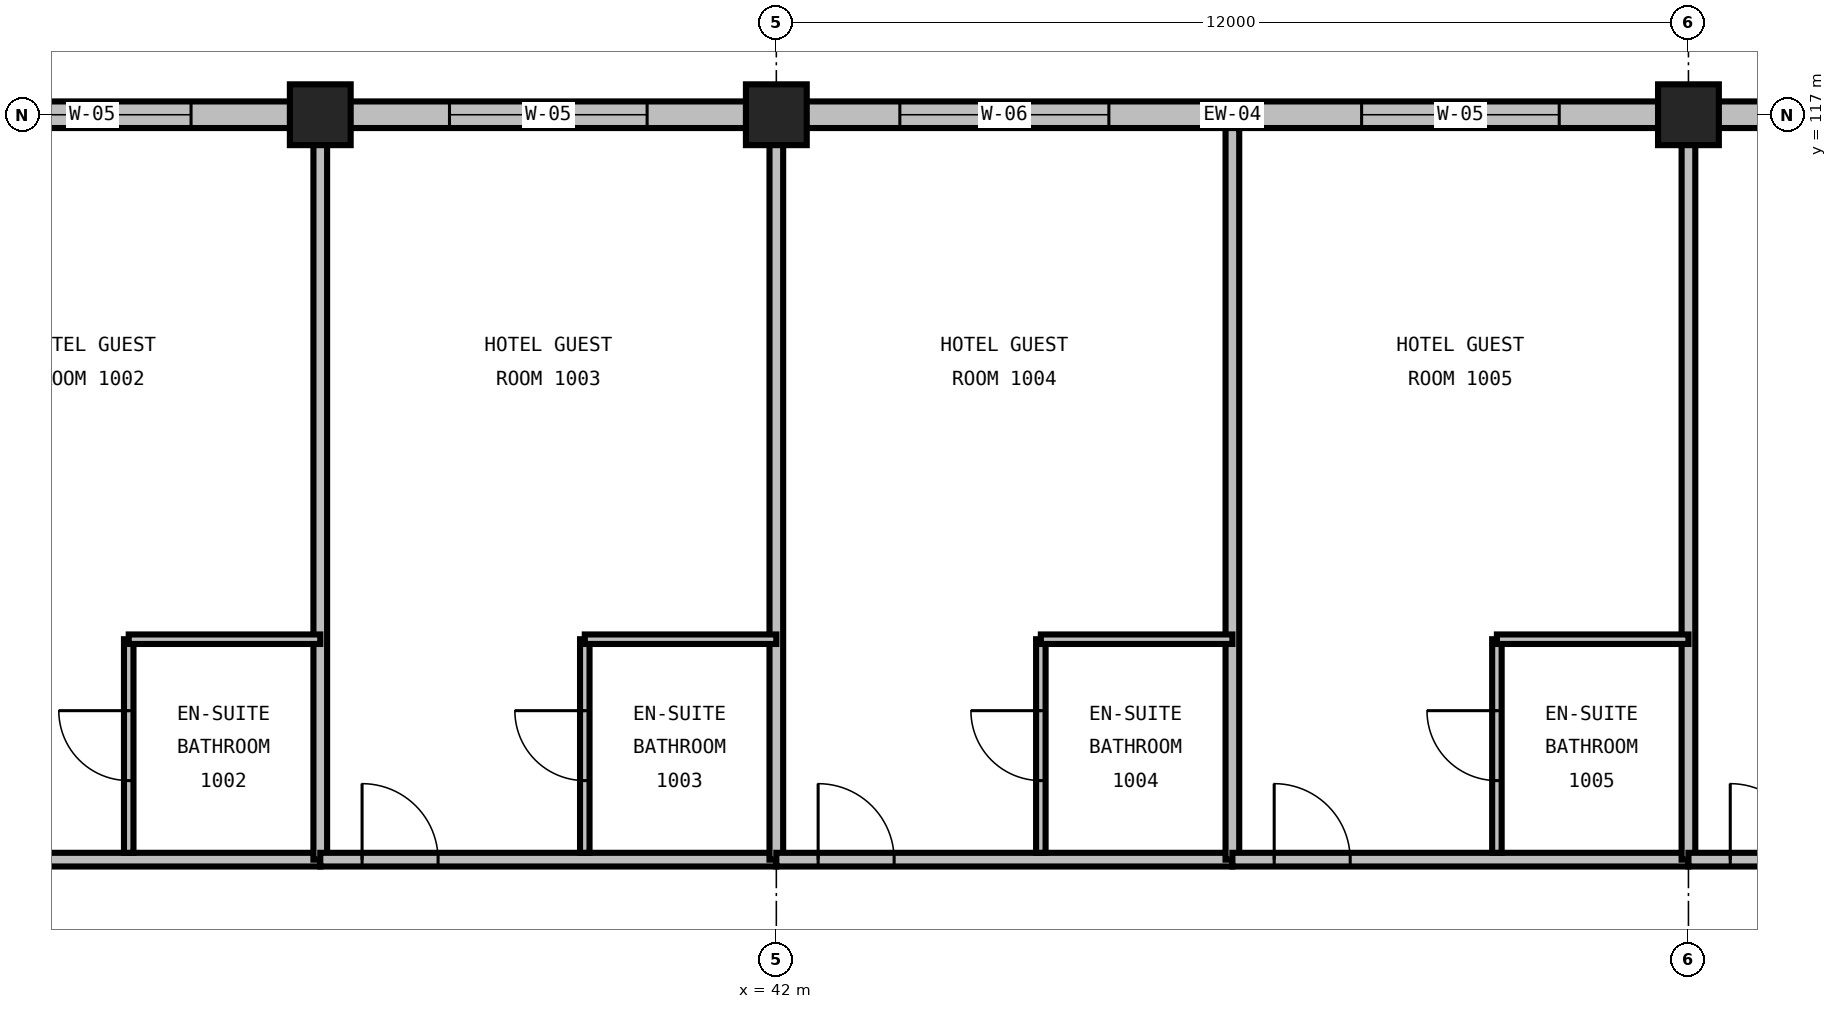
"""IFC4 building model, lengths in metres.
Left out: names, types, materials, properties, quantities, classifications, styles, units other than length and angle.
Written with IfcOpenShell. Run it as: python <this file> out.ifc"""

import sys

from ifc_helpers import new_model, si_unit, direction, frame, frame_2d, origin, origin_2d, place, context, subcontext, project, spatial, rectangle, extrude, element, fill, save


model = new_model("IFC4")
c1 = context("Model", 3, precision=1e-05, world=origin(), true_north=direction((0.0, 1.0)))
c2 = subcontext(c1, "Body", "Model", "MODEL_VIEW")
j1 = project(units=[si_unit("LENGTHUNIT", "METRE"), si_unit("PLANEANGLEUNIT", "RADIAN")], contexts=[c1])
p1 = place(None, origin())
s1 = spatial("IfcSite", under=j1, at=p1, CompositionType="ELEMENT")
p2 = place(p1, origin())
s2 = spatial("IfcBuilding", under=s1, at=p2, CompositionType="ELEMENT")
p3 = place(p2, frame((0.0, 0.0, 45.6)))
s3 = spatial("IfcBuildingStorey", under=s2, at=p3, CompositionType="ELEMENT", Elevation=45.6)
for number, where, z_axis, x_axis in (
    (1, (36.0, 117.0, 0.0), (0.0, 0.0, 1.0), (1.0, 0.0, 0.0)),
    (2, (42.0, 117.0, 0.0), (0.0, 0.0, 1.0), (1.0, 0.0, 0.0)),
    (3, (54.0, 117.0, 0.0), (0.0, 0.0, 1.0), (1.0, 0.0, 0.0)),
):
    element("IfcColumn", number, at=place(p3, frame(where, z_axis=z_axis, x_axis=x_axis)), inside=s3, PredefinedType="COLUMN", context=c2, shape_type="SweptSolid", body=[
        extrude(rectangle(XDim=0.8, YDim=0.8, at=origin_2d()), origin(), (0.0, 0.0, 1.0), 3.6),
    ])
p4 = place(p3, frame((36.0, 117.0, 0.0), z_axis=(0.0, 0.0, 1.0), x_axis=(-1.0, 0.0, 0.0)))
e4 = element("IfcWall", 4, at=p4, inside=s3, PredefinedType="STANDARD", context=c2, shape_type="SweptSolid", body=[
    extrude(rectangle(XDim=6.0, YDim=0.35, at=frame_2d((3.0, 0.0))), origin(), (0.0, 0.0, 1.0), 2.486),
])
p5 = place(p4, frame((1.7, 0.0, 0.72)))
e5 = element("IfcOpeningElement", 5, at=p5, cuts=e4, PredefinedType="OPENING", context=c2, shape_type="SweptSolid", body=[
    extrude(rectangle(XDim=2.6, YDim=1.69, at=frame_2d((1.3, 0.845))), frame((0.0, 0.19, 0.0), z_axis=(0.0, -1.0, 0.0), x_axis=(1.0, 0.0, 0.0)), (0.0, 0.0, 1.0), 0.38),
])
p6 = place(p3, frame((42.0, 117.0, 0.0), z_axis=(0.0, 0.0, 1.0), x_axis=(-1.0, 0.0, 0.0)))
e6 = element("IfcWall", 6, at=p6, inside=s3, PredefinedType="STANDARD", context=c2, shape_type="SweptSolid", body=[
    extrude(rectangle(XDim=6.0, YDim=0.35, at=frame_2d((3.0, 0.0))), origin(), (0.0, 0.0, 1.0), 2.486),
])
p7 = place(p6, frame((1.7, 0.0, 0.72)))
e7 = element("IfcOpeningElement", 7, at=p7, cuts=e6, PredefinedType="OPENING", context=c2, shape_type="SweptSolid", body=[
    extrude(rectangle(XDim=2.6, YDim=1.69, at=frame_2d((1.3, 0.845))), frame((0.0, 0.19, 0.0), z_axis=(0.0, -1.0, 0.0), x_axis=(1.0, 0.0, 0.0)), (0.0, 0.0, 1.0), 0.38),
])
p8 = place(p3, frame((54.0, 117.0, 0.0), z_axis=(0.0, 0.0, 1.0), x_axis=(-1.0, 0.0, 0.0)))
e8 = element("IfcWall", 8, at=p8, inside=s3, PredefinedType="STANDARD", context=c2, shape_type="SweptSolid", body=[
    extrude(rectangle(XDim=12.0, YDim=0.35, at=frame_2d((6.0, 0.0))), origin(), (0.0, 0.0, 1.0), 2.486),
])
p9 = place(p8, frame((1.7, 0.0, 0.72)))
e9 = element("IfcOpeningElement", 9, at=p9, cuts=e8, PredefinedType="OPENING", context=c2, shape_type="SweptSolid", body=[
    extrude(rectangle(XDim=2.6, YDim=1.69, at=frame_2d((1.3, 0.845))), frame((0.0, 0.19, 0.0), z_axis=(0.0, -1.0, 0.0), x_axis=(1.0, 0.0, 0.0)), (0.0, 0.0, 1.0), 0.38),
])
p10 = place(p8, frame((7.625, 0.0, 0.72)))
e10 = element("IfcOpeningElement", 10, at=p10, cuts=e8, PredefinedType="OPENING", context=c2, shape_type="SweptSolid", body=[
    extrude(rectangle(XDim=2.75, YDim=1.69, at=frame_2d((1.375, 0.845))), frame((0.0, 0.19, 0.0), z_axis=(0.0, -1.0, 0.0), x_axis=(1.0, 0.0, 0.0)), (0.0, 0.0, 1.0), 0.38),
])
p11 = place(p3, frame((66.0, 117.0, 0.0), z_axis=(0.0, 0.0, 1.0), x_axis=(-1.0, 0.0, 0.0)))
e11 = element("IfcWall", 11, at=p11, inside=s3, PredefinedType="STANDARD", context=c2, shape_type="SweptSolid", body=[
    extrude(rectangle(XDim=12.0, YDim=0.35, at=frame_2d((6.0, 0.0))), origin(), (0.0, 0.0, 1.0), 2.486),
])
p12 = place(p11, frame((1.7, 0.0, 0.72)))
e12 = element("IfcOpeningElement", 12, at=p12, cuts=e11, PredefinedType="OPENING", context=c2, shape_type="SweptSolid", body=[
    extrude(rectangle(XDim=2.6, YDim=1.69, at=frame_2d((1.3, 0.845))), frame((0.0, 0.19, 0.0), z_axis=(0.0, -1.0, 0.0), x_axis=(1.0, 0.0, 0.0)), (0.0, 0.0, 1.0), 0.38),
])
p13 = place(p11, frame((7.625, 0.0, 0.72)))
e13 = element("IfcOpeningElement", 13, at=p13, cuts=e11, PredefinedType="OPENING", context=c2, shape_type="SweptSolid", body=[
    extrude(rectangle(XDim=2.75, YDim=1.69, at=frame_2d((1.375, 0.845))), frame((0.0, 0.19, 0.0), z_axis=(0.0, -1.0, 0.0), x_axis=(1.0, 0.0, 0.0)), (0.0, 0.0, 1.0), 0.38),
])
p14 = place(p3, frame((30.0, 107.2, 0.0), z_axis=(0.0, 0.0, 1.0), x_axis=(1.0, 0.0, 0.0)))
e14 = element("IfcWall", 14, at=p14, inside=s3, PredefinedType="PARTITIONING", context=c2, shape_type="SweptSolid", body=[
    extrude(rectangle(XDim=6.0, YDim=0.18, at=frame_2d((3.0, 0.0))), origin(), (0.0, 0.0, 1.0), 3.29),
])
p15 = place(p14, frame((0.55, 0.0, 0.0)))
e15 = element("IfcOpeningElement", 15, at=p15, cuts=e14, PredefinedType="OPENING", context=c2, shape_type="SweptSolid", body=[
    extrude(rectangle(XDim=1.0, YDim=2.15, at=frame_2d((0.5, 1.075))), frame((0.0, 0.105, 0.0), z_axis=(0.0, -1.0, 0.0), x_axis=(1.0, 0.0, 0.0)), (0.0, 0.0, 1.0), 0.21),
])
p16 = place(p3, frame((36.0, 107.2, 0.0), z_axis=(0.0, 0.0, 1.0), x_axis=(0.0, 1.0, 0.0)))
e16 = element("IfcWall", 16, at=p16, inside=s3, PredefinedType="PARTITIONING", context=c2, shape_type="SweptSolid", body=[
    extrude(rectangle(XDim=9.625, YDim=0.18, at=frame_2d((4.812, 0.0))), origin(), (0.0, 0.0, 1.0), 2.59),
])
p17 = place(p3, frame((33.48, 107.29, 0.0), z_axis=(0.0, 0.0, 1.0), x_axis=(0.0, 1.0, 0.0)))
e17 = element("IfcWall", 17, at=p17, inside=s3, PredefinedType="PARTITIONING", context=c2, shape_type="SweptSolid", body=[
    extrude(rectangle(XDim=2.81, YDim=0.125, at=frame_2d((1.405, 0.0))), origin(), (0.0, 0.0, 1.0), 3.29),
])
p18 = place(p17, frame((0.95, 0.0, 0.0)))
e18 = element("IfcOpeningElement", 18, at=p18, cuts=e17, PredefinedType="OPENING", context=c2, shape_type="SweptSolid", body=[
    extrude(rectangle(XDim=0.92, YDim=2.1, at=frame_2d((0.46, 1.05))), frame((0.0, 0.077, 0.0), z_axis=(0.0, -1.0, 0.0), x_axis=(1.0, 0.0, 0.0)), (0.0, 0.0, 1.0), 0.155),
])
p19 = place(p3, frame((33.48, 110.1, 0.0), z_axis=(0.0, 0.0, 1.0), x_axis=(1.0, 0.0, 0.0)))
e19 = element("IfcWall", 19, at=p19, inside=s3, PredefinedType="PARTITIONING", context=c2, shape_type="SweptSolid", body=[
    extrude(rectangle(XDim=2.52, YDim=0.125, at=frame_2d((1.26, 0.0))), origin(), (0.0, 0.0, 1.0), 3.29),
])
p20 = place(p3, frame((36.0, 107.2, 0.0), z_axis=(0.0, 0.0, 1.0), x_axis=(1.0, 0.0, 0.0)))
e20 = element("IfcWall", 20, at=p20, inside=s3, PredefinedType="PARTITIONING", context=c2, shape_type="SweptSolid", body=[
    extrude(rectangle(XDim=6.0, YDim=0.18, at=frame_2d((3.0, 0.0))), origin(), (0.0, 0.0, 1.0), 3.29),
])
p21 = place(p20, frame((0.55, 0.0, 0.0)))
e21 = element("IfcOpeningElement", 21, at=p21, cuts=e20, PredefinedType="OPENING", context=c2, shape_type="SweptSolid", body=[
    extrude(rectangle(XDim=1.0, YDim=2.15, at=frame_2d((0.5, 1.075))), frame((0.0, 0.105, 0.0), z_axis=(0.0, -1.0, 0.0), x_axis=(1.0, 0.0, 0.0)), (0.0, 0.0, 1.0), 0.21),
])
p22 = place(p3, frame((42.0, 107.2, 0.0), z_axis=(0.0, 0.0, 1.0), x_axis=(0.0, 1.0, 0.0)))
e22 = element("IfcWall", 22, at=p22, inside=s3, PredefinedType="PARTITIONING", context=c2, shape_type="SweptSolid", body=[
    extrude(rectangle(XDim=9.625, YDim=0.18, at=frame_2d((4.812, 0.0))), origin(), (0.0, 0.0, 1.0), 2.59),
])
p23 = place(p3, frame((39.48, 107.29, 0.0), z_axis=(0.0, 0.0, 1.0), x_axis=(0.0, 1.0, 0.0)))
e23 = element("IfcWall", 23, at=p23, inside=s3, PredefinedType="PARTITIONING", context=c2, shape_type="SweptSolid", body=[
    extrude(rectangle(XDim=2.81, YDim=0.125, at=frame_2d((1.405, 0.0))), origin(), (0.0, 0.0, 1.0), 3.29),
])
p24 = place(p23, frame((0.95, 0.0, 0.0)))
e24 = element("IfcOpeningElement", 24, at=p24, cuts=e23, PredefinedType="OPENING", context=c2, shape_type="SweptSolid", body=[
    extrude(rectangle(XDim=0.92, YDim=2.1, at=frame_2d((0.46, 1.05))), frame((0.0, 0.077, 0.0), z_axis=(0.0, -1.0, 0.0), x_axis=(1.0, 0.0, 0.0)), (0.0, 0.0, 1.0), 0.155),
])
p25 = place(p3, frame((39.48, 110.1, 0.0), z_axis=(0.0, 0.0, 1.0), x_axis=(1.0, 0.0, 0.0)))
e25 = element("IfcWall", 25, at=p25, inside=s3, PredefinedType="PARTITIONING", context=c2, shape_type="SweptSolid", body=[
    extrude(rectangle(XDim=2.52, YDim=0.125, at=frame_2d((1.26, 0.0))), origin(), (0.0, 0.0, 1.0), 3.29),
])
p26 = place(p3, frame((42.0, 107.2, 0.0), z_axis=(0.0, 0.0, 1.0), x_axis=(1.0, 0.0, 0.0)))
e26 = element("IfcWall", 26, at=p26, inside=s3, PredefinedType="PARTITIONING", context=c2, shape_type="SweptSolid", body=[
    extrude(rectangle(XDim=6.0, YDim=0.18, at=frame_2d((3.0, 0.0))), origin(), (0.0, 0.0, 1.0), 3.29),
])
p27 = place(p26, frame((0.55, 0.0, 0.0)))
e27 = element("IfcOpeningElement", 27, at=p27, cuts=e26, PredefinedType="OPENING", context=c2, shape_type="SweptSolid", body=[
    extrude(rectangle(XDim=1.0, YDim=2.15, at=frame_2d((0.5, 1.075))), frame((0.0, 0.105, 0.0), z_axis=(0.0, -1.0, 0.0), x_axis=(1.0, 0.0, 0.0)), (0.0, 0.0, 1.0), 0.21),
])
p28 = place(p3, frame((48.0, 107.2, 0.0), z_axis=(0.0, 0.0, 1.0), x_axis=(0.0, 1.0, 0.0)))
e28 = element("IfcWall", 28, at=p28, inside=s3, PredefinedType="PARTITIONING", context=c2, shape_type="SweptSolid", body=[
    extrude(rectangle(XDim=9.625, YDim=0.18, at=frame_2d((4.812, 0.0))), origin(), (0.0, 0.0, 1.0), 3.29),
])
p29 = place(p3, frame((45.48, 107.29, 0.0), z_axis=(0.0, 0.0, 1.0), x_axis=(0.0, 1.0, 0.0)))
e29 = element("IfcWall", 29, at=p29, inside=s3, PredefinedType="PARTITIONING", context=c2, shape_type="SweptSolid", body=[
    extrude(rectangle(XDim=2.81, YDim=0.125, at=frame_2d((1.405, 0.0))), origin(), (0.0, 0.0, 1.0), 3.29),
])
p30 = place(p29, frame((0.95, 0.0, 0.0)))
e30 = element("IfcOpeningElement", 30, at=p30, cuts=e29, PredefinedType="OPENING", context=c2, shape_type="SweptSolid", body=[
    extrude(rectangle(XDim=0.92, YDim=2.1, at=frame_2d((0.46, 1.05))), frame((0.0, 0.077, 0.0), z_axis=(0.0, -1.0, 0.0), x_axis=(1.0, 0.0, 0.0)), (0.0, 0.0, 1.0), 0.155),
])
p31 = place(p3, frame((45.48, 110.1, 0.0), z_axis=(0.0, 0.0, 1.0), x_axis=(1.0, 0.0, 0.0)))
e31 = element("IfcWall", 31, at=p31, inside=s3, PredefinedType="PARTITIONING", context=c2, shape_type="SweptSolid", body=[
    extrude(rectangle(XDim=2.52, YDim=0.125, at=frame_2d((1.26, 0.0))), origin(), (0.0, 0.0, 1.0), 3.29),
])
p32 = place(p3, frame((48.0, 107.2, 0.0), z_axis=(0.0, 0.0, 1.0), x_axis=(1.0, 0.0, 0.0)))
e32 = element("IfcWall", 32, at=p32, inside=s3, PredefinedType="PARTITIONING", context=c2, shape_type="SweptSolid", body=[
    extrude(rectangle(XDim=6.0, YDim=0.18, at=frame_2d((3.0, 0.0))), origin(), (0.0, 0.0, 1.0), 3.29),
])
p33 = place(p32, frame((0.55, 0.0, 0.0)))
e33 = element("IfcOpeningElement", 33, at=p33, cuts=e32, PredefinedType="OPENING", context=c2, shape_type="SweptSolid", body=[
    extrude(rectangle(XDim=1.0, YDim=2.15, at=frame_2d((0.5, 1.075))), frame((0.0, 0.105, 0.0), z_axis=(0.0, -1.0, 0.0), x_axis=(1.0, 0.0, 0.0)), (0.0, 0.0, 1.0), 0.21),
])
p34 = place(p3, frame((54.0, 107.2, 0.0), z_axis=(0.0, 0.0, 1.0), x_axis=(0.0, 1.0, 0.0)))
e34 = element("IfcWall", 34, at=p34, inside=s3, PredefinedType="PARTITIONING", context=c2, shape_type="SweptSolid", body=[
    extrude(rectangle(XDim=9.625, YDim=0.18, at=frame_2d((4.812, 0.0))), origin(), (0.0, 0.0, 1.0), 2.59),
])
p35 = place(p3, frame((51.48, 107.29, 0.0), z_axis=(0.0, 0.0, 1.0), x_axis=(0.0, 1.0, 0.0)))
e35 = element("IfcWall", 35, at=p35, inside=s3, PredefinedType="PARTITIONING", context=c2, shape_type="SweptSolid", body=[
    extrude(rectangle(XDim=2.81, YDim=0.125, at=frame_2d((1.405, 0.0))), origin(), (0.0, 0.0, 1.0), 3.29),
])
p36 = place(p35, frame((0.95, 0.0, 0.0)))
e36 = element("IfcOpeningElement", 36, at=p36, cuts=e35, PredefinedType="OPENING", context=c2, shape_type="SweptSolid", body=[
    extrude(rectangle(XDim=0.92, YDim=2.1, at=frame_2d((0.46, 1.05))), frame((0.0, 0.077, 0.0), z_axis=(0.0, -1.0, 0.0), x_axis=(1.0, 0.0, 0.0)), (0.0, 0.0, 1.0), 0.155),
])
p37 = place(p3, frame((51.48, 110.1, 0.0), z_axis=(0.0, 0.0, 1.0), x_axis=(1.0, 0.0, 0.0)))
e37 = element("IfcWall", 37, at=p37, inside=s3, PredefinedType="PARTITIONING", context=c2, shape_type="SweptSolid", body=[
    extrude(rectangle(XDim=2.52, YDim=0.125, at=frame_2d((1.26, 0.0))), origin(), (0.0, 0.0, 1.0), 3.29),
])
p38 = place(p3, frame((54.0, 107.2, 0.0), z_axis=(0.0, 0.0, 1.0), x_axis=(1.0, 0.0, 0.0)))
e38 = element("IfcWall", 38, at=p38, inside=s3, PredefinedType="PARTITIONING", context=c2, shape_type="SweptSolid", body=[
    extrude(rectangle(XDim=6.0, YDim=0.18, at=frame_2d((3.0, 0.0))), origin(), (0.0, 0.0, 1.0), 3.29),
])
p39 = place(p38, frame((0.55, 0.0, 0.0)))
e39 = element("IfcOpeningElement", 39, at=p39, cuts=e38, PredefinedType="OPENING", context=c2, shape_type="SweptSolid", body=[
    extrude(rectangle(XDim=1.0, YDim=2.15, at=frame_2d((0.5, 1.075))), frame((0.0, 0.105, 0.0), z_axis=(0.0, -1.0, 0.0), x_axis=(1.0, 0.0, 0.0)), (0.0, 0.0, 1.0), 0.21),
])
p40 = place(p5, origin())
e40 = element("IfcWindow", 40, at=p40, inside=s3, PartitioningType="DOUBLE_PANEL_VERTICAL", PredefinedType="WINDOW", context=c2, shape_type="SweptSolid", body=[
    extrude(rectangle(XDim=2.6, YDim=1.69, at=frame_2d((1.3, 0.845))), frame((0.0, 0.03, 0.0), z_axis=(0.0, -1.0, 0.0), x_axis=(1.0, 0.0, 0.0)), (0.0, 0.0, 1.0), 0.06),
])
fill(e5, e40)
p41 = place(p7, origin())
e41 = element("IfcWindow", 41, at=p41, inside=s3, PartitioningType="DOUBLE_PANEL_VERTICAL", PredefinedType="WINDOW", context=c2, shape_type="SweptSolid", body=[
    extrude(rectangle(XDim=2.6, YDim=1.69, at=frame_2d((1.3, 0.845))), frame((0.0, 0.03, 0.0), z_axis=(0.0, -1.0, 0.0), x_axis=(1.0, 0.0, 0.0)), (0.0, 0.0, 1.0), 0.06),
])
fill(e7, e41)
p42 = place(p9, origin())
e42 = element("IfcWindow", 42, at=p42, inside=s3, PartitioningType="DOUBLE_PANEL_VERTICAL", PredefinedType="WINDOW", context=c2, shape_type="SweptSolid", body=[
    extrude(rectangle(XDim=2.6, YDim=1.69, at=frame_2d((1.3, 0.845))), frame((0.0, 0.03, 0.0), z_axis=(0.0, -1.0, 0.0), x_axis=(1.0, 0.0, 0.0)), (0.0, 0.0, 1.0), 0.06),
])
fill(e9, e42)
p43 = place(p10, origin())
e43 = element("IfcWindow", 43, at=p43, inside=s3, PartitioningType="TRIPLE_PANEL_VERTICAL", PredefinedType="WINDOW", context=c2, shape_type="SweptSolid", body=[
    extrude(rectangle(XDim=2.75, YDim=1.69, at=frame_2d((1.375, 0.845))), frame((0.0, 0.03, 0.0), z_axis=(0.0, -1.0, 0.0), x_axis=(1.0, 0.0, 0.0)), (0.0, 0.0, 1.0), 0.06),
])
fill(e10, e43)
p44 = place(p18, origin())
e44 = element("IfcDoor", 44, at=p44, inside=s3, OperationType="SINGLE_SWING_RIGHT", PredefinedType="DOOR", context=c2, shape_type="SweptSolid", body=[
    extrude(rectangle(XDim=0.92, YDim=2.1, at=frame_2d((0.46, 1.05))), frame((0.0, 0.025, 0.0), z_axis=(0.0, -1.0, 0.0), x_axis=(1.0, 0.0, 0.0)), (0.0, 0.0, 1.0), 0.05),
])
fill(e18, e44)
p45 = place(p21, origin())
e45 = element("IfcDoor", 45, at=p45, inside=s3, OperationType="SINGLE_SWING_LEFT", PredefinedType="DOOR", context=c2, shape_type="SweptSolid", body=[
    extrude(rectangle(XDim=1.0, YDim=2.15, at=frame_2d((0.5, 1.075))), frame((0.0, 0.025, 0.0), z_axis=(0.0, -1.0, 0.0), x_axis=(1.0, 0.0, 0.0)), (0.0, 0.0, 1.0), 0.05),
])
fill(e21, e45)
p46 = place(p24, origin())
e46 = element("IfcDoor", 46, at=p46, inside=s3, OperationType="SINGLE_SWING_RIGHT", PredefinedType="DOOR", context=c2, shape_type="SweptSolid", body=[
    extrude(rectangle(XDim=0.92, YDim=2.1, at=frame_2d((0.46, 1.05))), frame((0.0, 0.025, 0.0), z_axis=(0.0, -1.0, 0.0), x_axis=(1.0, 0.0, 0.0)), (0.0, 0.0, 1.0), 0.05),
])
fill(e24, e46)
p47 = place(p27, origin())
e47 = element("IfcDoor", 47, at=p47, inside=s3, OperationType="SINGLE_SWING_LEFT", PredefinedType="DOOR", context=c2, shape_type="SweptSolid", body=[
    extrude(rectangle(XDim=1.0, YDim=2.15, at=frame_2d((0.5, 1.075))), frame((0.0, 0.025, 0.0), z_axis=(0.0, -1.0, 0.0), x_axis=(1.0, 0.0, 0.0)), (0.0, 0.0, 1.0), 0.05),
])
fill(e27, e47)
p48 = place(p30, origin())
e48 = element("IfcDoor", 48, at=p48, inside=s3, OperationType="SINGLE_SWING_RIGHT", PredefinedType="DOOR", context=c2, shape_type="SweptSolid", body=[
    extrude(rectangle(XDim=0.92, YDim=2.1, at=frame_2d((0.46, 1.05))), frame((0.0, 0.025, 0.0), z_axis=(0.0, -1.0, 0.0), x_axis=(1.0, 0.0, 0.0)), (0.0, 0.0, 1.0), 0.05),
])
fill(e30, e48)
p49 = place(p33, origin())
e49 = element("IfcDoor", 49, at=p49, inside=s3, OperationType="SINGLE_SWING_LEFT", PredefinedType="DOOR", context=c2, shape_type="SweptSolid", body=[
    extrude(rectangle(XDim=1.0, YDim=2.15, at=frame_2d((0.5, 1.075))), frame((0.0, 0.025, 0.0), z_axis=(0.0, -1.0, 0.0), x_axis=(1.0, 0.0, 0.0)), (0.0, 0.0, 1.0), 0.05),
])
fill(e33, e49)
p50 = place(p36, origin())
e50 = element("IfcDoor", 50, at=p50, inside=s3, OperationType="SINGLE_SWING_RIGHT", PredefinedType="DOOR", context=c2, shape_type="SweptSolid", body=[
    extrude(rectangle(XDim=0.92, YDim=2.1, at=frame_2d((0.46, 1.05))), frame((0.0, 0.025, 0.0), z_axis=(0.0, -1.0, 0.0), x_axis=(1.0, 0.0, 0.0)), (0.0, 0.0, 1.0), 0.05),
])
fill(e36, e50)
p51 = place(p39, origin())
e51 = element("IfcDoor", 51, at=p51, inside=s3, OperationType="SINGLE_SWING_LEFT", PredefinedType="DOOR", context=c2, shape_type="SweptSolid", body=[
    extrude(rectangle(XDim=1.0, YDim=2.15, at=frame_2d((0.5, 1.075))), frame((0.0, 0.025, 0.0), z_axis=(0.0, -1.0, 0.0), x_axis=(1.0, 0.0, 0.0)), (0.0, 0.0, 1.0), 0.05),
])
fill(e39, e51)
save(model, sys.argv[1])
